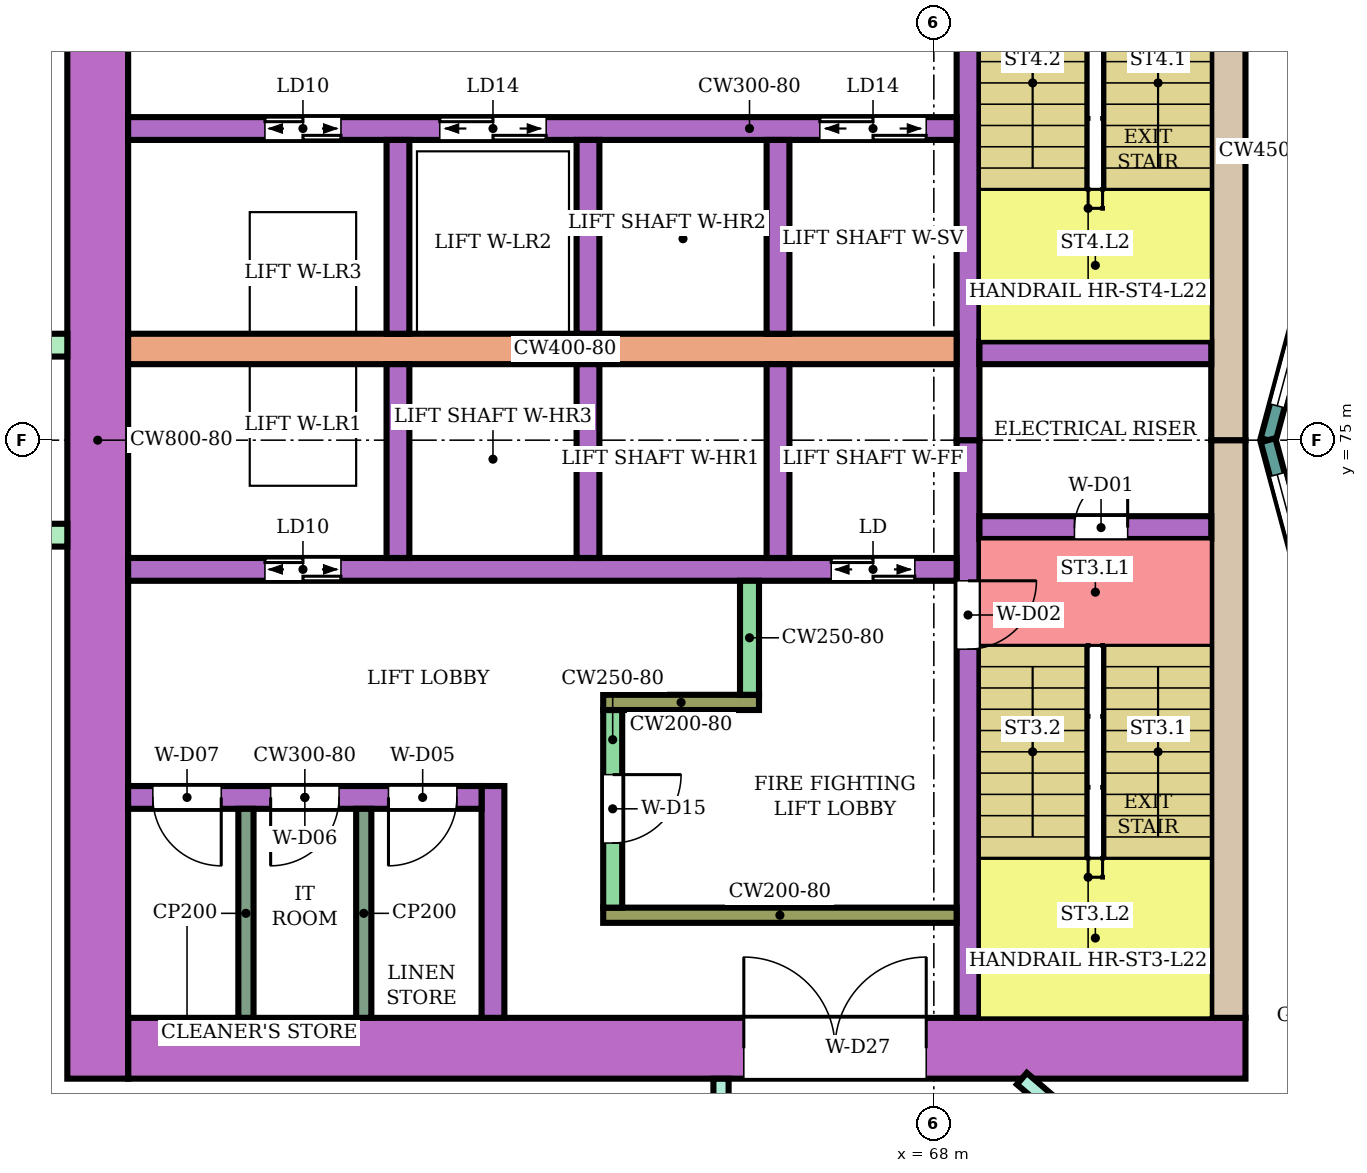
"""IFC4 building model, lengths in metres.
Left out: names, types, materials, properties, quantities, classifications, styles, units other than length and angle.
Written with IfcOpenShell. Run it as: python <this file> out.ifc"""

import sys

from ifc_helpers import new_model, si_unit, direction, frame, frame_2d, origin, place, context, subcontext, project, spatial, rectangle, extrude, element, fill, save


model = new_model("IFC4")
c1 = context("Model", 3, precision=1e-05, world=origin(), true_north=direction((0.0, 1.0)))
c2 = subcontext(c1, "Body", "Model", "MODEL_VIEW")
j1 = project(units=[si_unit("LENGTHUNIT", "METRE"), si_unit("PLANEANGLEUNIT", "RADIAN")], contexts=[c1])
p1 = place(None, origin())
s1 = spatial("IfcSite", under=j1, at=p1, CompositionType="ELEMENT")
p2 = place(p1, origin())
s2 = spatial("IfcBuilding", under=s1, at=p2, CompositionType="ELEMENT")
p3 = place(p2, frame((0.0, 0.0, 97.6)))
s3 = spatial("IfcBuildingStorey", under=s2, at=p3, CompositionType="ELEMENT", Elevation=97.6)
p4 = place(p3, frame((72.1, 67.0, 0.0), z_axis=(0.0, 0.0, 1.0), x_axis=(-1.0, 0.0, 0.0)))
e1 = element("IfcWall", 1, at=p4, inside=s3, PredefinedType="SHEAR", context=c2, shape_type="SweptSolid", body=[
    extrude(rectangle(XDim=14.7, YDim=0.8, at=frame_2d((7.35, 0.0))), origin(), (0.0, 0.0, 1.0), 3.48),
])
p5 = place(p4, frame((4.2, 0.0, 0.0)))
e2 = element("IfcOpeningElement", 2, at=p5, cuts=e1, PredefinedType="OPENING", context=c2, shape_type="SweptSolid", body=[
    extrude(rectangle(XDim=2.4, YDim=2.4, at=frame_2d((1.2, 1.2))), frame((0.0, 0.41, 0.0), z_axis=(0.0, -1.0, 0.0), x_axis=(1.0, 0.0, 0.0)), (0.0, 0.0, 1.0), 0.82),
])
for number, where, z_axis, x_axis in (
    (3, (71.875, 75.0, 0.0), (0.0, 0.0, 1.0), (0.0, -1.0, 0.0)),
    (4, (71.875, 82.6, 0.0), (0.0, 0.0, 1.0), (0.0, -1.0, 0.0)),
):
    element("IfcWall", number, at=place(p3, frame(where, z_axis=z_axis, x_axis=x_axis)), inside=s3, PredefinedType="SHEAR", context=c2, shape_type="SweptSolid", body=[
        extrude(rectangle(XDim=7.6, YDim=0.45, at=frame_2d((3.8, 0.0))), origin(), (0.0, 0.0, 1.0), 3.48),
    ])
p6 = place(p3, frame((57.0, 83.4, 0.0), z_axis=(0.0, 0.0, 1.0), x_axis=(0.0, -1.0, 0.0)))
e5 = element("IfcWall", 5, at=p6, inside=s3, PredefinedType="SHEAR", context=c2, shape_type="SweptSolid", body=[
    extrude(rectangle(XDim=16.8, YDim=0.8, at=frame_2d((8.4, 0.0))), origin(), (0.0, 0.0, 1.0), 3.48),
])
p7 = place(p3, frame((68.45, 75.0, 0.0), z_axis=(0.0, 0.0, 1.0), x_axis=(0.0, -1.0, 0.0)))
e6 = element("IfcWall", 6, at=p7, inside=s3, PredefinedType="SHEAR", context=c2, shape_type="SweptSolid", body=[
    extrude(rectangle(XDim=7.6, YDim=0.3, at=frame_2d((3.8, 0.0))), origin(), (0.0, 0.0, 1.0), 3.48),
])
p8 = place(p7, frame((1.85, 0.0, 0.0)))
e7 = element("IfcOpeningElement", 7, at=p8, cuts=e6, PredefinedType="OPENING", context=c2, shape_type="SweptSolid", body=[
    extrude(rectangle(XDim=0.9, YDim=2.1, at=frame_2d((0.45, 1.05))), frame((0.0, 0.16, 0.0), z_axis=(0.0, -1.0, 0.0), x_axis=(1.0, 0.0, 0.0)), (0.0, 0.0, 1.0), 0.32),
])
p9 = place(p3, frame((68.45, 82.6, 0.0), z_axis=(0.0, 0.0, 1.0), x_axis=(0.0, -1.0, 0.0)))
e8 = element("IfcWall", 8, at=p9, inside=s3, PredefinedType="SHEAR", context=c2, shape_type="SweptSolid", body=[
    extrude(rectangle(XDim=7.6, YDim=0.3, at=frame_2d((3.8, 0.0))), origin(), (0.0, 0.0, 1.0), 3.48),
])
p10 = place(p9, frame((0.25, 0.0, 0.0)))
e9 = element("IfcOpeningElement", 9, at=p10, cuts=e8, PredefinedType="OPENING", context=c2, shape_type="SweptSolid", body=[
    extrude(rectangle(XDim=0.9, YDim=2.1, at=frame_2d((0.45, 1.05))), frame((0.0, 0.16, 0.0), z_axis=(0.0, -1.0, 0.0), x_axis=(1.0, 0.0, 0.0)), (0.0, 0.0, 1.0), 0.32),
])
p11 = place(p3, frame((71.65, 73.85, 0.0), z_axis=(0.0, 0.0, 1.0), x_axis=(-1.0, 0.0, 0.0)))
e10 = element("IfcWall", 10, at=p11, inside=s3, PredefinedType="SHEAR", context=c2, shape_type="SweptSolid", body=[
    extrude(rectangle(XDim=3.05, YDim=0.3, at=frame_2d((1.525, 0.0))), origin(), (0.0, 0.0, 1.0), 3.48),
])
p12 = place(p11, frame((1.1, 0.0, 0.0)))
e11 = element("IfcOpeningElement", 11, at=p12, cuts=e10, PredefinedType="OPENING", context=c2, shape_type="SweptSolid", body=[
    extrude(rectangle(XDim=0.7, YDim=2.0, at=frame_2d((0.35, 1.0))), frame((0.0, 0.16, 0.0), z_axis=(0.0, -1.0, 0.0), x_axis=(1.0, 0.0, 0.0)), (0.0, 0.0, 1.0), 0.32),
])
p13 = place(p3, frame((71.65, 76.15, 0.0), z_axis=(0.0, 0.0, 1.0), x_axis=(-1.0, 0.0, 0.0)))
e12 = element("IfcWall", 12, at=p13, inside=s3, PredefinedType="SHEAR", context=c2, shape_type="SweptSolid", body=[
    extrude(rectangle(XDim=3.05, YDim=0.3, at=frame_2d((1.525, 0.0))), origin(), (0.0, 0.0, 1.0), 3.48),
])
p14 = place(p3, frame((68.3, 73.3, 0.0), z_axis=(0.0, 0.0, 1.0), x_axis=(-1.0, 0.0, 0.0)))
e13 = element("IfcWall", 13, at=p14, inside=s3, PredefinedType="SHEAR", context=c2, shape_type="SweptSolid", body=[
    extrude(rectangle(XDim=10.9, YDim=0.3, at=frame_2d((5.45, 0.0))), origin(), (0.0, 0.0, 1.0), 3.48),
])
p15 = place(p14, frame((0.55, 0.0, 0.0)))
e14 = element("IfcOpeningElement", 14, at=p15, cuts=e13, PredefinedType="OPENING", context=c2, shape_type="SweptSolid", body=[
    extrude(rectangle(XDim=1.1, YDim=2.1, at=frame_2d((0.55, 1.05))), frame((0.0, 0.16, 0.0), z_axis=(0.0, -1.0, 0.0), x_axis=(1.0, 0.0, 0.0)), (0.0, 0.0, 1.0), 0.32),
])
p16 = place(p14, frame((8.1, 0.0, 0.0)))
e15 = element("IfcOpeningElement", 15, at=p16, cuts=e13, PredefinedType="OPENING", context=c2, shape_type="SweptSolid", body=[
    extrude(rectangle(XDim=1.0, YDim=2.1, at=frame_2d((0.5, 1.05))), frame((0.0, 0.16, 0.0), z_axis=(0.0, -1.0, 0.0), x_axis=(1.0, 0.0, 0.0)), (0.0, 0.0, 1.0), 0.32),
])
p17 = place(p3, frame((68.3, 76.2, 0.0), z_axis=(0.0, 0.0, 1.0), x_axis=(-1.0, 0.0, 0.0)))
e16 = element("IfcWall", 16, at=p17, inside=s3, PredefinedType="SHEAR", context=c2, shape_type="SweptSolid", body=[
    extrude(rectangle(XDim=10.9, YDim=0.4, at=frame_2d((5.45, 0.0))), origin(), (0.0, 0.0, 1.0), 3.48),
])
p18 = place(p3, frame((68.3, 79.1, 0.0), z_axis=(0.0, 0.0, 1.0), x_axis=(-1.0, 0.0, 0.0)))
e17 = element("IfcWall", 17, at=p18, inside=s3, PredefinedType="SHEAR", context=c2, shape_type="SweptSolid", body=[
    extrude(rectangle(XDim=10.9, YDim=0.3, at=frame_2d((5.45, 0.0))), origin(), (0.0, 0.0, 1.0), 3.48),
])
p19 = place(p18, frame((0.4, 0.0, 0.0)))
e18 = element("IfcOpeningElement", 18, at=p19, cuts=e17, PredefinedType="OPENING", context=c2, shape_type="SweptSolid", body=[
    extrude(rectangle(XDim=1.4, YDim=2.1, at=frame_2d((0.7, 1.05))), frame((0.0, 0.16, 0.0), z_axis=(0.0, -1.0, 0.0), x_axis=(1.0, 0.0, 0.0)), (0.0, 0.0, 1.0), 0.32),
])
p20 = place(p18, frame((5.4, 0.0, 0.0)))
e19 = element("IfcOpeningElement", 19, at=p20, cuts=e17, PredefinedType="OPENING", context=c2, shape_type="SweptSolid", body=[
    extrude(rectangle(XDim=1.4, YDim=2.1, at=frame_2d((0.7, 1.05))), frame((0.0, 0.16, 0.0), z_axis=(0.0, -1.0, 0.0), x_axis=(1.0, 0.0, 0.0)), (0.0, 0.0, 1.0), 0.32),
])
p21 = place(p18, frame((8.1, 0.0, 0.0)))
e20 = element("IfcOpeningElement", 20, at=p21, cuts=e17, PredefinedType="OPENING", context=c2, shape_type="SweptSolid", body=[
    extrude(rectangle(XDim=1.0, YDim=2.1, at=frame_2d((0.5, 1.05))), frame((0.0, 0.16, 0.0), z_axis=(0.0, -1.0, 0.0), x_axis=(1.0, 0.0, 0.0)), (0.0, 0.0, 1.0), 0.32),
])
for number, where, z_axis, x_axis in (
    (21, (65.95, 76.0, 0.0), (0.0, 0.0, 1.0), (0.0, -1.0, 0.0)),
    (22, (63.45, 76.0, 0.0), (0.0, 0.0, 1.0), (0.0, -1.0, 0.0)),
    (23, (60.95, 76.0, 0.0), (0.0, 0.0, 1.0), (0.0, -1.0, 0.0)),
    (24, (65.95, 78.95, 0.0), (0.0, 0.0, 1.0), (0.0, -1.0, 0.0)),
    (25, (63.45, 78.95, 0.0), (0.0, 0.0, 1.0), (0.0, -1.0, 0.0)),
    (26, (60.95, 78.95, 0.0), (0.0, 0.0, 1.0), (0.0, -1.0, 0.0)),
):
    element("IfcWall", number, at=place(p3, frame(where, z_axis=z_axis, x_axis=x_axis)), inside=s3, PredefinedType="SHEAR", context=c2, shape_type="SweptSolid", body=[
        extrude(rectangle(XDim=2.55, YDim=0.3, at=frame_2d((1.275, 0.0))), origin(), (0.0, 0.0, 1.0), 3.48),
    ])
p22 = place(p3, frame((68.3, 68.75, 0.0), z_axis=(0.0, 0.0, 1.0), x_axis=(-1.0, 0.0, 0.0)))
e27 = element("IfcWall", 27, at=p22, inside=s3, PredefinedType="SHEAR", context=c2, shape_type="SweptSolid", body=[
    extrude(rectangle(XDim=4.65, YDim=0.2, at=frame_2d((2.325, 0.0))), origin(), (0.0, 0.0, 1.0), 3.48),
])
p23 = place(p3, frame((63.775, 71.45, 0.0), z_axis=(0.0, 0.0, 1.0), x_axis=(0.0, -1.0, 0.0)))
e28 = element("IfcWall", 28, at=p23, inside=s3, PredefinedType="SHEAR", context=c2, shape_type="SweptSolid", body=[
    extrude(rectangle(XDim=2.6, YDim=0.25, at=frame_2d((1.3, 0.0))), origin(), (0.0, 0.0, 1.0), 3.48),
])
p24 = place(p23, frame((0.85, 0.0, 0.0)))
e29 = element("IfcOpeningElement", 29, at=p24, cuts=e28, PredefinedType="OPENING", context=c2, shape_type="SweptSolid", body=[
    extrude(rectangle(XDim=0.9, YDim=2.1, at=frame_2d((0.45, 1.05))), frame((0.0, 0.135, 0.0), z_axis=(0.0, -1.0, 0.0), x_axis=(1.0, 0.0, 0.0)), (0.0, 0.0, 1.0), 0.27),
])
p25 = place(p3, frame((65.7, 71.55, 0.0), z_axis=(0.0, 0.0, 1.0), x_axis=(-1.0, 0.0, 0.0)))
e30 = element("IfcWall", 30, at=p25, inside=s3, PredefinedType="SHEAR", context=c2, shape_type="SweptSolid", body=[
    extrude(rectangle(XDim=2.05, YDim=0.2, at=frame_2d((1.025, 0.0))), origin(), (0.0, 0.0, 1.0), 3.48),
])
p26 = place(p3, frame((65.575, 73.15, 0.0), z_axis=(0.0, 0.0, 1.0), x_axis=(0.0, -1.0, 0.0)))
e31 = element("IfcWall", 31, at=p26, inside=s3, PredefinedType="SHEAR", context=c2, shape_type="SweptSolid", body=[
    extrude(rectangle(XDim=1.5, YDim=0.25, at=frame_2d((0.75, 0.0))), origin(), (0.0, 0.0, 1.0), 3.48),
])
p27 = place(p3, frame((62.2, 70.45, 0.0), z_axis=(0.0, 0.0, 1.0), x_axis=(0.0, -1.0, 0.0)))
e32 = element("IfcWall", 32, at=p27, inside=s3, PredefinedType="SHEAR", context=c2, shape_type="SweptSolid", body=[
    extrude(rectangle(XDim=3.05, YDim=0.3, at=frame_2d((1.525, 0.0))), origin(), (0.0, 0.0, 1.0), 3.48),
])
p28 = place(p3, frame((62.05, 70.3, 0.0), z_axis=(0.0, 0.0, 1.0), x_axis=(-1.0, 0.0, 0.0)))
e33 = element("IfcWall", 33, at=p28, inside=s3, PredefinedType="SHEAR", context=c2, shape_type="SweptSolid", body=[
    extrude(rectangle(XDim=4.65, YDim=0.3, at=frame_2d((2.325, 0.0))), origin(), (0.0, 0.0, 1.0), 3.48),
])
p29 = place(p28, frame((0.325, 0.0, 0.0)))
e34 = element("IfcOpeningElement", 34, at=p29, cuts=e33, PredefinedType="OPENING", context=c2, shape_type="SweptSolid", body=[
    extrude(rectangle(XDim=0.9, YDim=2.1, at=frame_2d((0.45, 1.05))), frame((0.0, 0.16, 0.0), z_axis=(0.0, -1.0, 0.0), x_axis=(1.0, 0.0, 0.0)), (0.0, 0.0, 1.0), 0.32),
])
p30 = place(p28, frame((1.875, 0.0, 0.0)))
e35 = element("IfcOpeningElement", 35, at=p30, cuts=e33, PredefinedType="OPENING", context=c2, shape_type="SweptSolid", body=[
    extrude(rectangle(XDim=0.9, YDim=2.1, at=frame_2d((0.45, 1.05))), frame((0.0, 0.16, 0.0), z_axis=(0.0, -1.0, 0.0), x_axis=(1.0, 0.0, 0.0)), (0.0, 0.0, 1.0), 0.32),
])
p31 = place(p28, frame((3.425, 0.0, 0.0)))
e36 = element("IfcOpeningElement", 36, at=p31, cuts=e33, PredefinedType="OPENING", context=c2, shape_type="SweptSolid", body=[
    extrude(rectangle(XDim=0.9, YDim=2.1, at=frame_2d((0.45, 1.05))), frame((0.0, 0.16, 0.0), z_axis=(0.0, -1.0, 0.0), x_axis=(1.0, 0.0, 0.0)), (0.0, 0.0, 1.0), 0.32),
])
for number, where, z_axis, x_axis in (
    (37, (56.6, 76.25, 0.0), (0.0, 0.0, 1.0), (-1.0, 0.0, 0.0)),
    (38, (56.6, 73.75, 0.0), (0.0, 0.0, 1.0), (-1.0, 0.0, 0.0)),
):
    element("IfcWall", number, at=place(p3, frame(where, z_axis=z_axis, x_axis=x_axis)), inside=s3, PredefinedType="NOTDEFINED", context=c2, shape_type="SweptSolid", body=[
        extrude(rectangle(XDim=2.416, YDim=0.3, at=frame_2d((1.208, 0.0))), origin(), (0.0, 0.0, 1.0), 3.8),
    ])
p32 = place(p3, frame((73.415, 78.802, 0.0), z_axis=(0.0, 0.0, 1.0), x_axis=(-0.258789828301, -0.965933654434, 0.0)))
e39 = element("IfcWall", 39, at=p32, inside=s3, PredefinedType="NOTDEFINED", context=c2, shape_type="SweptSolid", body=[
    extrude(rectangle(XDim=3.936, YDim=0.2, at=frame_2d((1.968, 0.0))), origin(), (0.0, 0.0, 1.0), 3.8),
])
p33 = place(p32, frame((0.468, 0.0, 0.9)))
e40 = element("IfcOpeningElement", 40, at=p33, cuts=e39, PredefinedType="OPENING", context=c2, shape_type="SweptSolid", body=[
    extrude(rectangle(XDim=3.0, YDim=2.3, at=frame_2d((1.5, 1.15))), frame((0.0, 0.11, 0.0), z_axis=(0.0, -1.0, 0.0), x_axis=(1.0, 0.0, 0.0)), (0.0, 0.0, 1.0), 0.22),
])
p34 = place(p3, frame((72.396, 75.0, 0.0), z_axis=(0.0, 0.0, 1.0), x_axis=(0.258789828301, -0.965933654434, 0.0)))
e41 = element("IfcWall", 41, at=p34, inside=s3, PredefinedType="NOTDEFINED", context=c2, shape_type="SweptSolid", body=[
    extrude(rectangle(XDim=3.936, YDim=0.2, at=frame_2d((1.968, 0.0))), origin(), (0.0, 0.0, 1.0), 3.8),
])
p35 = place(p34, frame((0.468, 0.0, 0.9)))
e42 = element("IfcOpeningElement", 42, at=p35, cuts=e41, PredefinedType="OPENING", context=c2, shape_type="SweptSolid", body=[
    extrude(rectangle(XDim=3.0, YDim=2.3, at=frame_2d((1.5, 1.15))), frame((0.0, 0.11, 0.0), z_axis=(0.0, -1.0, 0.0), x_axis=(1.0, 0.0, 0.0)), (0.0, 0.0, 1.0), 0.22),
])
p36 = place(p3, frame((65.2, 65.2, 0.0), z_axis=(0.0, 0.0, 1.0), x_axis=(0.0, 1.0, 0.0)))
e43 = element("IfcWall", 43, at=p36, inside=s3, PredefinedType="PARTITIONING", context=c2, shape_type="SweptSolid", body=[
    extrude(rectangle(XDim=1.399, YDim=0.2, at=frame_2d((0.7, 0.0))), origin(), (0.0, 0.0, 1.0), 3.35),
])
p37 = place(p3, frame((69.158, 66.6, 0.0), z_axis=(0.0, 0.0, 1.0), x_axis=(0.757976058094, -0.652282373943, 0.0)))
e44 = element("IfcWall", 44, at=p37, inside=s3, PredefinedType="PARTITIONING", context=c2, shape_type="SweptSolid", body=[
    extrude(rectangle(XDim=5.16, YDim=0.2, at=frame_2d((2.58, 0.0))), origin(), (0.0, 0.0, 1.0), 3.35),
])
p38 = place(p37, frame((1.6, 0.0, 0.0)))
e45 = element("IfcOpeningElement", 45, at=p38, cuts=e44, PredefinedType="OPENING", context=c2, shape_type="SweptSolid", body=[
    extrude(rectangle(XDim=1.0, YDim=2.1, at=frame_2d((0.5, 1.05))), frame((0.0, 0.11, 0.0), z_axis=(0.0, -1.0, 0.0), x_axis=(1.0, 0.0, 0.0)), (0.0, 0.0, 1.0), 0.22),
])
p39 = place(p3, frame((71.596, 64.635, 0.0), z_axis=(0.0, 0.0, 1.0), x_axis=(0.652285007511, 0.757973791748, 0.0)))
e46 = element("IfcWall", 46, at=p39, inside=s3, PredefinedType="PARTITIONING", context=c2, shape_type="SweptSolid", body=[
    extrude(rectangle(XDim=2.65, YDim=0.1, at=frame_2d((1.325, 0.0))), origin(), (0.0, 0.0, 1.0), 3.35),
])
p40 = place(p39, frame((0.6, 0.0, 0.0)))
e47 = element("IfcOpeningElement", 47, at=p40, cuts=e46, PredefinedType="OPENING", context=c2, shape_type="SweptSolid", body=[
    extrude(rectangle(XDim=0.8, YDim=2.1, at=frame_2d((0.4, 1.05))), frame((0.0, 0.06, 0.0), z_axis=(0.0, -1.0, 0.0), x_axis=(1.0, 0.0, 0.0)), (0.0, 0.0, 1.0), 0.12),
])
for number, where, z_axis, x_axis in (
    (48, (60.5, 70.15, 0.0), (0.0, 0.0, 1.0), (0.0, -1.0, 0.0)),
    (49, (58.95, 70.15, 0.0), (0.0, 0.0, 1.0), (0.0, -1.0, 0.0)),
):
    element("IfcWall", number, at=place(p3, frame(where, z_axis=z_axis, x_axis=x_axis)), inside=s3, PredefinedType="PARTITIONING", context=c2, shape_type="SweptSolid", body=[
        extrude(rectangle(XDim=2.75, YDim=0.2, at=frame_2d((1.375, 0.0))), origin(), (0.0, 0.0, 1.0), 3.48),
    ])
p41 = place(p33, origin())
e50 = element("IfcWindow", 50, at=p41, inside=s3, PartitioningType="SINGLE_PANEL", PredefinedType="WINDOW", context=c2, shape_type="SweptSolid", body=[
    extrude(rectangle(XDim=3.0, YDim=2.3, at=frame_2d((1.5, 1.15))), frame((0.0, 0.03, 0.0), z_axis=(0.0, -1.0, 0.0), x_axis=(1.0, 0.0, 0.0)), (0.0, 0.0, 1.0), 0.06),
])
fill(e40, e50)
p42 = place(p35, origin())
e51 = element("IfcWindow", 51, at=p42, inside=s3, PartitioningType="SINGLE_PANEL", PredefinedType="WINDOW", context=c2, shape_type="SweptSolid", body=[
    extrude(rectangle(XDim=3.0, YDim=2.3, at=frame_2d((1.5, 1.15))), frame((0.0, 0.03, 0.0), z_axis=(0.0, -1.0, 0.0), x_axis=(1.0, 0.0, 0.0)), (0.0, 0.0, 1.0), 0.06),
])
fill(e42, e51)
p43 = place(p12, frame((0.7, 0.0, 0.0), z_axis=(0.0, 0.0, 1.0), x_axis=(-1.0, 0.0, 0.0)))
e52 = element("IfcDoor", 52, at=p43, inside=s3, OperationType="SINGLE_SWING_RIGHT", PredefinedType="DOOR", context=c2, shape_type="SweptSolid", body=[
    extrude(rectangle(XDim=0.7, YDim=2.0, at=frame_2d((0.35, 1.0))), frame((0.0, 0.025, 0.0), z_axis=(0.0, -1.0, 0.0), x_axis=(1.0, 0.0, 0.0)), (0.0, 0.0, 1.0), 0.05),
])
fill(e11, e52)
p44 = place(p8, origin())
e53 = element("IfcDoor", 53, at=p44, inside=s3, OperationType="SINGLE_SWING_LEFT", PredefinedType="DOOR", context=c2, shape_type="SweptSolid", body=[
    extrude(rectangle(XDim=0.9, YDim=2.1, at=frame_2d((0.45, 1.05))), frame((0.0, 0.025, 0.0), z_axis=(0.0, -1.0, 0.0), x_axis=(1.0, 0.0, 0.0)), (0.0, 0.0, 1.0), 0.05),
])
fill(e7, e53)
p45 = place(p15, origin())
e54 = element("IfcDoor", 54, at=p45, inside=s3, OperationType="DOUBLE_DOOR_SLIDING", PredefinedType="DOOR", context=c2, shape_type="SweptSolid", body=[
    extrude(rectangle(XDim=1.1, YDim=2.1, at=frame_2d((0.55, 1.05))), frame((0.0, 0.025, 0.0), z_axis=(0.0, -1.0, 0.0), x_axis=(1.0, 0.0, 0.0)), (0.0, 0.0, 1.0), 0.05),
])
fill(e14, e54)
p46 = place(p16, origin())
e55 = element("IfcDoor", 55, at=p46, inside=s3, OperationType="DOUBLE_DOOR_SLIDING", PredefinedType="DOOR", context=c2, shape_type="SweptSolid", body=[
    extrude(rectangle(XDim=1.0, YDim=2.1, at=frame_2d((0.5, 1.05))), frame((0.0, 0.025, 0.0), z_axis=(0.0, -1.0, 0.0), x_axis=(1.0, 0.0, 0.0)), (0.0, 0.0, 1.0), 0.05),
])
fill(e15, e55)
p47 = place(p19, origin())
e56 = element("IfcDoor", 56, at=p47, inside=s3, OperationType="DOUBLE_DOOR_SLIDING", PredefinedType="DOOR", context=c2, shape_type="SweptSolid", body=[
    extrude(rectangle(XDim=1.4, YDim=2.1, at=frame_2d((0.7, 1.05))), frame((0.0, 0.025, 0.0), z_axis=(0.0, -1.0, 0.0), x_axis=(1.0, 0.0, 0.0)), (0.0, 0.0, 1.0), 0.05),
])
fill(e18, e56)
p48 = place(p20, origin())
e57 = element("IfcDoor", 57, at=p48, inside=s3, OperationType="DOUBLE_DOOR_SLIDING", PredefinedType="DOOR", context=c2, shape_type="SweptSolid", body=[
    extrude(rectangle(XDim=1.4, YDim=2.1, at=frame_2d((0.7, 1.05))), frame((0.0, 0.025, 0.0), z_axis=(0.0, -1.0, 0.0), x_axis=(1.0, 0.0, 0.0)), (0.0, 0.0, 1.0), 0.05),
])
fill(e19, e57)
p49 = place(p21, origin())
e58 = element("IfcDoor", 58, at=p49, inside=s3, OperationType="DOUBLE_DOOR_SLIDING", PredefinedType="DOOR", context=c2, shape_type="SweptSolid", body=[
    extrude(rectangle(XDim=1.0, YDim=2.1, at=frame_2d((0.5, 1.05))), frame((0.0, 0.025, 0.0), z_axis=(0.0, -1.0, 0.0), x_axis=(1.0, 0.0, 0.0)), (0.0, 0.0, 1.0), 0.05),
])
fill(e20, e58)
p50 = place(p24, origin())
e59 = element("IfcDoor", 59, at=p50, inside=s3, OperationType="SINGLE_SWING_LEFT", PredefinedType="DOOR", context=c2, shape_type="SweptSolid", body=[
    extrude(rectangle(XDim=0.9, YDim=2.1, at=frame_2d((0.45, 1.05))), frame((0.0, 0.025, 0.0), z_axis=(0.0, -1.0, 0.0), x_axis=(1.0, 0.0, 0.0)), (0.0, 0.0, 1.0), 0.05),
])
fill(e29, e59)
p51 = place(p29, origin())
e60 = element("IfcDoor", 60, at=p51, inside=s3, OperationType="SINGLE_SWING_RIGHT", PredefinedType="DOOR", context=c2, shape_type="SweptSolid", body=[
    extrude(rectangle(XDim=0.9, YDim=2.1, at=frame_2d((0.45, 1.05))), frame((0.0, 0.025, 0.0), z_axis=(0.0, -1.0, 0.0), x_axis=(1.0, 0.0, 0.0)), (0.0, 0.0, 1.0), 0.05),
])
fill(e34, e60)
p52 = place(p30, origin())
e61 = element("IfcDoor", 61, at=p52, inside=s3, OperationType="SINGLE_SWING_RIGHT", PredefinedType="DOOR", context=c2, shape_type="SweptSolid", body=[
    extrude(rectangle(XDim=0.9, YDim=2.1, at=frame_2d((0.45, 1.05))), frame((0.0, 0.025, 0.0), z_axis=(0.0, -1.0, 0.0), x_axis=(1.0, 0.0, 0.0)), (0.0, 0.0, 1.0), 0.05),
])
fill(e35, e61)
p53 = place(p31, origin())
e62 = element("IfcDoor", 62, at=p53, inside=s3, OperationType="SINGLE_SWING_LEFT", PredefinedType="DOOR", context=c2, shape_type="SweptSolid", body=[
    extrude(rectangle(XDim=0.9, YDim=2.1, at=frame_2d((0.45, 1.05))), frame((0.0, 0.025, 0.0), z_axis=(0.0, -1.0, 0.0), x_axis=(1.0, 0.0, 0.0)), (0.0, 0.0, 1.0), 0.05),
])
fill(e36, e62)
p54 = place(p5, frame((2.4, 0.0, 0.0), z_axis=(0.0, 0.0, 1.0), x_axis=(-1.0, 0.0, 0.0)))
e63 = element("IfcDoor", 63, at=p54, inside=s3, OperationType="DOUBLE_DOOR_SINGLE_SWING", PredefinedType="DOOR", context=c2, shape_type="SweptSolid", body=[
    extrude(rectangle(XDim=2.4, YDim=2.4, at=frame_2d((1.2, 1.2))), frame((0.0, 0.025, 0.0), z_axis=(0.0, -1.0, 0.0), x_axis=(1.0, 0.0, 0.0)), (0.0, 0.0, 1.0), 0.05),
])
fill(e2, e63)
save(model, sys.argv[1])
